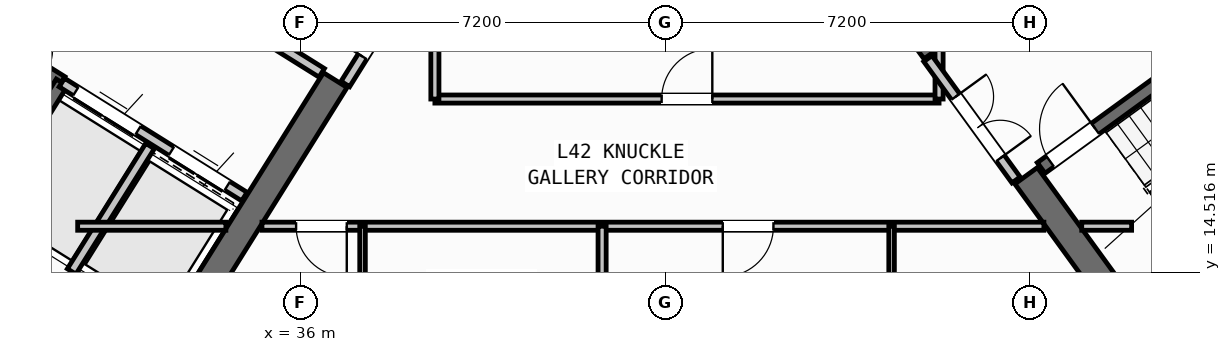
"""IFC4 building model, lengths in metres.
Left out: names, types, materials, properties, quantities, classifications, styles, units other than length and angle.
Written with IfcOpenShell. Run it as: python <this file> out.ifc"""

import sys

from ifc_helpers import new_model, si_unit, direction, frame, frame_2d, origin, place, context, subcontext, project, spatial, rectangle, extrude, source, transform, mapped, element, fill, save


model = new_model("IFC4")
c1 = context("Model", 3, precision=1e-05, world=origin(), true_north=direction((0.0, 1.0)))
c2 = subcontext(c1, "Body", "Model", "MODEL_VIEW")
j1 = project(units=[si_unit("LENGTHUNIT", "METRE"), si_unit("PLANEANGLEUNIT", "RADIAN")], contexts=[c1])
p1 = place(None, origin())
s1 = spatial("IfcSite", under=j1, at=p1, CompositionType="ELEMENT")
p2 = place(p1, origin())
s2 = spatial("IfcBuilding", under=s1, at=p2, CompositionType="ELEMENT")
p3 = place(p2, frame((0.0, 0.0, 165.9)))
s3 = spatial("IfcBuildingStorey", under=s2, at=p3, CompositionType="ELEMENT", Elevation=165.9)
p4 = place(p3, frame((33.366, 12.477, 0.0), z_axis=(0.0, 0.0, 1.0), x_axis=(-0.848047359947, 0.529920442413, 0.0)))
e1 = element("IfcWall", 1, at=p4, inside=s3, PredefinedType="SHEAR", context=c2, shape_type="SweptSolid", body=[
    extrude(rectangle(XDim=13.14, YDim=0.55, at=frame_2d((6.57, 0.0))), origin(), (0.0, 0.0, 1.0), 3.32),
])
p5 = place(p3, frame((36.683, 18.304, 0.0), z_axis=(0.0, 0.0, 1.0), x_axis=(-0.529896466841, -0.848062341122, 0.0)))
e2 = element("IfcWall", 2, at=p5, inside=s3, PredefinedType="SHEAR", context=c2, shape_type="SweptSolid", body=[
    extrude(rectangle(XDim=6.425, YDim=0.55, at=frame_2d((3.212, 0.0))), origin(), (0.0, 0.0, 1.0), 3.32),
])
p6 = place(p3, frame((52.359, 13.14, 0.0), z_axis=(0.0, 0.0, 1.0), x_axis=(0.809014896919, 0.587788139183, 0.0)))
e3 = element("IfcWall", 3, at=p6, inside=s3, PredefinedType="SHEAR", context=c2, shape_type="SweptSolid", body=[
    extrude(rectangle(XDim=12.34, YDim=0.55, at=frame_2d((6.17, 0.0))), origin(), (0.0, 0.0, 1.0), 3.32),
])
p7 = place(p3, frame((52.42, 13.524, 0.0), z_axis=(0.0, 0.0, 1.0), x_axis=(-0.587802113096, 0.809004744015, 0.0)))
e4 = element("IfcWall", 4, at=p7, inside=s3, PredefinedType="SHEAR", context=c2, shape_type="SweptSolid", body=[
    extrude(rectangle(XDim=3.575, YDim=0.55, at=frame_2d((1.788, 0.0))), origin(), (0.0, 0.0, 1.0), 3.32),
])
p8 = place(p3, frame((48.526, 18.884, 0.0), z_axis=(0.0, 0.0, 1.0), x_axis=(-0.587764933797, 0.809031756236, 0.0)))
e5 = element("IfcWall", 5, at=p8, inside=s3, PredefinedType="SHEAR", context=c2, shape_type="SweptSolid", body=[
    extrude(rectangle(XDim=6.425, YDim=0.55, at=frame_2d((3.212, 0.0))), origin(), (0.0, 0.0, 1.0), 3.32),
])
p9 = place(p3, frame((31.28, 18.261, 0.0), z_axis=(0.0, 0.0, 1.0), x_axis=(-0.848051618787, 0.529913626805, 0.0)))
e6 = element("IfcWall", 6, at=p9, inside=s3, PredefinedType="SHEAR", context=c2, shape_type="SweptSolid", body=[
    extrude(rectangle(XDim=7.46, YDim=0.26, at=frame_2d((3.73, 0.0))), origin(), (0.0, 0.0, 1.0), 3.32),
])
p10 = place(p9, frame((0.36, 0.0, 0.0)))
e7 = element("IfcOpeningElement", 7, at=p10, cuts=e6, PredefinedType="OPENING", context=c2, shape_type="SweptSolid", body=[
    extrude(rectangle(XDim=0.86, YDim=2.05, at=frame_2d((0.43, 1.025))), frame((0.0, 0.14, 0.0), z_axis=(0.0, -1.0, 0.0), x_axis=(1.0, 0.0, 0.0)), (0.0, 0.0, 1.0), 0.28),
])
p11 = place(p3, frame((31.288, 18.256, 0.0), z_axis=(0.0, 0.0, 1.0), x_axis=(-0.529943379326, -0.848033026897, 0.0)))
e8 = element("IfcWall", 8, at=p11, inside=s3, PredefinedType="SHEAR", context=c2, shape_type="SweptSolid", body=[
    extrude(rectangle(XDim=3.16, YDim=0.26, at=frame_2d((1.58, 0.0))), origin(), (0.0, 0.0, 1.0), 3.32),
])
p12 = place(p3, frame((34.891, 16.005, 0.0), z_axis=(0.0, 0.0, 1.0), x_axis=(-0.848062873452, 0.529895614884, 0.0)))
e9 = element("IfcWall", 9, at=p12, inside=s3, PredefinedType="STANDARD", context=c2, shape_type="SweptSolid", body=[
    extrude(rectangle(XDim=4.248, YDim=0.2, at=frame_2d((2.124, 0.0))), origin(), (0.0, 0.0, 1.0), 3.31),
])
p13 = place(p12, frame((0.398, 0.0, 0.0)))
e10 = element("IfcOpeningElement", 10, at=p13, cuts=e9, PredefinedType="OPENING", context=c2, shape_type="SweptSolid", body=[
    extrude(rectangle(XDim=1.3, YDim=2.2, at=frame_2d((0.65, 1.1))), frame((0.0, 0.11, 0.0), z_axis=(0.0, -1.0, 0.0), x_axis=(1.0, 0.0, 0.0)), (0.0, 0.0, 1.0), 0.22),
])
p14 = place(p12, frame((2.473, 0.0, 0.0)))
e11 = element("IfcOpeningElement", 11, at=p14, cuts=e9, PredefinedType="OPENING", context=c2, shape_type="SweptSolid", body=[
    extrude(rectangle(XDim=1.45, YDim=2.25, at=frame_2d((0.725, 1.125))), frame((0.0, 0.11, 0.0), z_axis=(0.0, -1.0, 0.0), x_axis=(1.0, 0.0, 0.0)), (0.0, 0.0, 1.0), 0.22),
])
p15 = place(p3, frame((36.417, 18.447, 0.0), z_axis=(0.0, 0.0, 1.0), x_axis=(-0.848064879198, 0.529892404805, 0.0)))
e12 = element("IfcWall", 12, at=p15, inside=s3, PredefinedType="STANDARD", context=c2, shape_type="SweptSolid", body=[
    extrude(rectangle(XDim=5.768, YDim=0.2, at=frame_2d((2.884, 0.0))), origin(), (0.0, 0.0, 1.0), 3.31),
])
p16 = place(p15, frame((2.548, 0.0, 0.0)))
e13 = element("IfcOpeningElement", 13, at=p16, cuts=e12, PredefinedType="OPENING", context=c2, shape_type="SweptSolid", body=[
    extrude(rectangle(XDim=1.15, YDim=2.1, at=frame_2d((0.575, 1.05))), frame((0.0, 0.11, 0.0), z_axis=(0.0, -1.0, 0.0), x_axis=(1.0, 0.0, 0.0)), (0.0, 0.0, 1.0), 0.22),
])
p17 = place(p3, frame((33.029, 17.003, 0.0), z_axis=(0.0, 0.0, 1.0), x_axis=(-0.529916267533, -0.848049968695, 0.0)))
e14 = element("IfcWall", 14, at=p17, inside=s3, PredefinedType="STANDARD", context=c2, shape_type="SweptSolid", body=[
    extrude(rectangle(XDim=2.92, YDim=0.2, at=frame_2d((1.46, 0.0))), origin(), (0.0, 0.0, 1.0), 3.31),
])
p18 = place(p3, frame((52.472, 14.013, 0.0), z_axis=(0.0, 0.0, 1.0), x_axis=(0.809028366311, 0.587769599847, 0.0)))
e15 = element("IfcWall", 15, at=p18, inside=s3, PredefinedType="SHEAR", context=c2, shape_type="SweptSolid", body=[
    extrude(rectangle(XDim=7.33, YDim=0.26, at=frame_2d((3.665, 0.0))), origin(), (0.0, 0.0, 1.0), 3.32),
])
p19 = place(p3, frame((50.615, 16.57, 0.0), z_axis=(0.0, 0.0, 1.0), x_axis=(0.809028366311, 0.587769599847, 0.0)))
e16 = element("IfcWall", 16, at=p19, inside=s3, PredefinedType="SHEAR", context=c2, shape_type="SweptSolid", body=[
    extrude(rectangle(XDim=7.33, YDim=0.26, at=frame_2d((3.665, 0.0))), origin(), (0.0, 0.0, 1.0), 3.32),
])
p20 = place(p19, frame((0.22, 0.0, 0.0)))
e17 = element("IfcOpeningElement", 17, at=p20, cuts=e16, PredefinedType="OPENING", context=c2, shape_type="SweptSolid", body=[
    extrude(rectangle(XDim=1.1, YDim=2.1, at=frame_2d((0.55, 1.05))), frame((0.0, 0.14, 0.0), z_axis=(0.0, -1.0, 0.0), x_axis=(1.0, 0.0, 0.0)), (0.0, 0.0, 1.0), 0.28),
])
p21 = place(p3, frame((32.164, 10.374, 0.0), z_axis=(0.0, 0.0, 1.0), x_axis=(-0.848044107957, 0.529925646633, 0.0)))
e18 = element("IfcWall", 18, at=p21, inside=s3, PredefinedType="PARTITIONING", context=c2, shape_type="SweptSolid", body=[
    extrude(rectangle(XDim=15.57, YDim=0.16, at=frame_2d((7.785, 0.0))), origin(), (0.0, 0.0, 1.0), 3.31),
])
p22 = place(p21, frame((10.83, 0.0, 0.0)))
e19 = element("IfcOpeningElement", 19, at=p22, cuts=e18, PredefinedType="OPENING", context=c2, shape_type="SweptSolid", body=[
    extrude(rectangle(XDim=1.0, YDim=2.1, at=frame_2d((0.5, 1.05))), frame((0.0, 0.09, 0.0), z_axis=(0.0, -1.0, 0.0), x_axis=(1.0, 0.0, 0.0)), (0.0, 0.0, 1.0), 0.18),
])
p23 = place(p3, frame((38.451, 20.737, 0.0), z_axis=(0.0, 0.0, 1.0), x_axis=(-0.529924799939, -0.848044637038, 0.0)))
e20 = element("IfcWall", 20, at=p23, inside=s3, PredefinedType="STANDARD", context=c2, shape_type="SweptSolid", body=[
    extrude(rectangle(XDim=2.96, YDim=0.2, at=frame_2d((1.48, 0.0))), origin(), (0.0, 0.0, 1.0), 3.31),
])
p24 = place(p23, frame((1.46, 0.0, 0.0)))
e21 = element("IfcOpeningElement", 21, at=p24, cuts=e20, PredefinedType="OPENING", context=c2, shape_type="SweptSolid", body=[
    extrude(rectangle(XDim=0.86, YDim=2.05, at=frame_2d((0.43, 1.025))), frame((0.0, 0.11, 0.0), z_axis=(0.0, -1.0, 0.0), x_axis=(1.0, 0.0, 0.0)), (0.0, 0.0, 1.0), 0.22),
])
p25 = place(p3, frame((31.6, 15.42, 0.0), z_axis=(0.0, 0.0, 1.0), x_axis=(1.0, 0.0, 0.0)))
e22 = element("IfcWall", 22, at=p25, inside=s3, PredefinedType="PARTITIONING", context=c2, shape_type="SweptSolid", body=[
    extrude(rectangle(XDim=2.925, YDim=0.16, at=frame_2d((1.462, 0.0))), origin(), (0.0, 0.0, 1.0), 3.31),
])
p26 = place(p3, frame((35.237, 15.42, 0.0), z_axis=(0.0, 0.0, 1.0), x_axis=(1.0, 0.0, 0.0)))
e23 = element("IfcWall", 23, at=p26, inside=s3, PredefinedType="PARTITIONING", context=c2, shape_type="SweptSolid", body=[
    extrude(rectangle(XDim=15.432, YDim=0.16, at=frame_2d((7.716, 0.0))), origin(), (0.0, 0.0, 1.0), 3.31),
])
p27 = place(p26, frame((0.674, 0.0, 0.0)))
e24 = element("IfcOpeningElement", 24, at=p27, cuts=e23, PredefinedType="OPENING", context=c2, shape_type="SweptSolid", body=[
    extrude(rectangle(XDim=1.0, YDim=2.1, at=frame_2d((0.5, 1.05))), frame((0.0, 0.09, 0.0), z_axis=(0.0, -1.0, 0.0), x_axis=(1.0, 0.0, 0.0)), (0.0, 0.0, 1.0), 0.18),
])
p28 = place(p26, frame((9.094, 0.0, 0.0)))
e25 = element("IfcOpeningElement", 25, at=p28, cuts=e23, PredefinedType="OPENING", context=c2, shape_type="SweptSolid", body=[
    extrude(rectangle(XDim=1.0, YDim=2.1, at=frame_2d((0.5, 1.05))), frame((0.0, 0.09, 0.0), z_axis=(0.0, -1.0, 0.0), x_axis=(1.0, 0.0, 0.0)), (0.0, 0.0, 1.0), 0.18),
])
p29 = place(p3, frame((51.416, 15.42, 0.0), z_axis=(0.0, 0.0, 1.0), x_axis=(1.0, 0.0, 0.0)))
e26 = element("IfcWall", 26, at=p29, inside=s3, PredefinedType="PARTITIONING", context=c2, shape_type="SweptSolid", body=[
    extrude(rectangle(XDim=0.984, YDim=0.16, at=frame_2d((0.492, 0.0))), origin(), (0.0, 0.0, 1.0), 3.31),
])
p30 = place(p3, frame((38.65, 17.93, 0.0), z_axis=(0.0, 0.0, 1.0), x_axis=(1.0, 0.0, 0.0)))
e27 = element("IfcWall", 27, at=p30, inside=s3, PredefinedType="PARTITIONING", context=c2, shape_type="SweptSolid", body=[
    extrude(rectangle(XDim=9.95, YDim=0.16, at=frame_2d((4.975, 0.0))), origin(), (0.0, 0.0, 1.0), 3.31),
])
p31 = place(p30, frame((4.475, 0.0, 0.0)))
e28 = element("IfcOpeningElement", 28, at=p31, cuts=e27, PredefinedType="OPENING", context=c2, shape_type="SweptSolid", body=[
    extrude(rectangle(XDim=1.0, YDim=2.1, at=frame_2d((0.5, 1.05))), frame((0.0, 0.09, 0.0), z_axis=(0.0, -1.0, 0.0), x_axis=(1.0, 0.0, 0.0)), (0.0, 0.0, 1.0), 0.18),
])
p32 = place(p3, frame((38.65, 17.93, 0.0), z_axis=(0.0, 0.0, 1.0), x_axis=(0.0, 1.0, 0.0)))
e29 = element("IfcWall", 29, at=p32, inside=s3, PredefinedType="PARTITIONING", context=c2, shape_type="SweptSolid", body=[
    extrude(rectangle(XDim=2.951, YDim=0.16, at=frame_2d((1.476, 0.0))), origin(), (0.0, 0.0, 1.0), 3.31),
])
p33 = place(p3, frame((48.6, 17.93, 0.0), z_axis=(0.0, 0.0, 1.0), x_axis=(0.0, 1.0, 0.0)))
e30 = element("IfcWall", 30, at=p33, inside=s3, PredefinedType="PARTITIONING", context=c2, shape_type="SweptSolid", body=[
    extrude(rectangle(XDim=0.993, YDim=0.16, at=frame_2d((0.496, 0.0))), origin(), (0.0, 0.0, 1.0), 3.31),
])
p34 = place(p3, frame((50.119, 16.333, 0.0), z_axis=(0.0, 0.0, 1.0), x_axis=(-0.587749856981, 0.809042709391, 0.0)))
e31 = element("IfcWall", 31, at=p34, inside=s3, PredefinedType="STANDARD", context=c2, shape_type="SweptSolid", body=[
    extrude(rectangle(XDim=2.96, YDim=0.2, at=frame_2d((1.48, 0.0))), origin(), (0.0, 0.0, 1.0), 3.31),
])
p35 = place(p34, frame((0.53, 0.0, 0.0)))
e32 = element("IfcOpeningElement", 32, at=p35, cuts=e31, PredefinedType="OPENING", context=c2, shape_type="SweptSolid", body=[
    extrude(rectangle(XDim=1.5, YDim=2.15, at=frame_2d((0.75, 1.075))), frame((0.0, 0.11, 0.0), z_axis=(0.0, -1.0, 0.0), x_axis=(1.0, 0.0, 0.0)), (0.0, 0.0, 1.0), 0.22),
])
p36 = place(p3, frame((41.95, 1.96, 0.0), z_axis=(0.0, 0.0, 1.0), x_axis=(0.0, 1.0, 0.0)))
e33 = element("IfcWall", 33, at=p36, inside=s3, PredefinedType="PARTITIONING", context=c2, shape_type="SweptSolid", body=[
    extrude(rectangle(XDim=13.46, YDim=0.16, at=frame_2d((6.73, 0.0))), origin(), (0.0, 0.0, 1.0), 3.31),
])
p37 = place(p3, frame((37.222, 1.96, 0.0), z_axis=(0.0, 0.0, 1.0), x_axis=(0.0, 1.0, 0.0)))
e34 = element("IfcWall", 34, at=p37, inside=s3, PredefinedType="PARTITIONING", context=c2, shape_type="SweptSolid", body=[
    extrude(rectangle(XDim=13.46, YDim=0.11, at=frame_2d((6.73, 0.0))), origin(), (0.0, 0.0, 1.0), 3.31),
])
p38 = place(p37, frame((5.2, 0.0, 0.0)))
e35 = element("IfcOpeningElement", 35, at=p38, cuts=e34, PredefinedType="OPENING", context=c2, shape_type="SweptSolid", body=[
    extrude(rectangle(XDim=0.92, YDim=2.08, at=frame_2d((0.46, 1.04))), frame((0.0, 0.065, 0.0), z_axis=(0.0, -1.0, 0.0), x_axis=(1.0, 0.0, 0.0)), (0.0, 0.0, 1.0), 0.13),
])
p39 = place(p37, frame((10.45, 0.0, 0.0)))
e36 = element("IfcOpeningElement", 36, at=p39, cuts=e34, PredefinedType="OPENING", context=c2, shape_type="SweptSolid", body=[
    extrude(rectangle(XDim=0.88, YDim=2.08, at=frame_2d((0.44, 1.04))), frame((0.0, 0.065, 0.0), z_axis=(0.0, -1.0, 0.0), x_axis=(1.0, 0.0, 0.0)), (0.0, 0.0, 1.0), 0.13),
])
p40 = place(p3, frame((47.663, 1.96, 0.0), z_axis=(0.0, 0.0, 1.0), x_axis=(0.0, 1.0, 0.0)))
e37 = element("IfcWall", 37, at=p40, inside=s3, PredefinedType="PARTITIONING", context=c2, shape_type="SweptSolid", body=[
    extrude(rectangle(XDim=13.46, YDim=0.11, at=frame_2d((6.73, 0.0))), origin(), (0.0, 0.0, 1.0), 3.31),
])
p41 = place(p40, frame((6.3, 0.0, 0.0)))
e38 = element("IfcOpeningElement", 38, at=p41, cuts=e37, PredefinedType="OPENING", context=c2, shape_type="SweptSolid", body=[
    extrude(rectangle(XDim=0.92, YDim=2.08, at=frame_2d((0.46, 1.04))), frame((0.0, 0.065, 0.0), z_axis=(0.0, -1.0, 0.0), x_axis=(1.0, 0.0, 0.0)), (0.0, 0.0, 1.0), 0.13),
])
p42 = place(p40, frame((11.1, 0.0, 0.0)))
e39 = element("IfcOpeningElement", 39, at=p42, cuts=e37, PredefinedType="OPENING", context=c2, shape_type="SweptSolid", body=[
    extrude(rectangle(XDim=0.88, YDim=2.08, at=frame_2d((0.44, 1.04))), frame((0.0, 0.065, 0.0), z_axis=(0.0, -1.0, 0.0), x_axis=(1.0, 0.0, 0.0)), (0.0, 0.0, 1.0), 0.13),
])
m1 = source(origin(), c2, "Body", "SweptSolid", [
    extrude(rectangle(XDim=1.3, YDim=2.2, at=frame_2d((0.65, 1.1))), frame((0.0, 0.025, 0.0), z_axis=(0.0, -1.0, 0.0), x_axis=(1.0, 0.0, 0.0)), (0.0, 0.0, 1.0), 0.05),
])
p43 = place(p13, origin())
e40 = element("IfcDoor", 40, at=p43, inside=s3, OperationType="DOUBLE_DOOR_SLIDING", PredefinedType="DOOR", context=c2, shape_type="MappedRepresentation", body=[
    mapped(m1, transform((0.0, 0.0, 0.0), scale=1.0)),
])
fill(e10, e40)
m2 = source(origin(), c2, "Body", "SweptSolid", [
    extrude(rectangle(XDim=1.45, YDim=2.25, at=frame_2d((0.725, 1.125))), frame((0.0, 0.025, 0.0), z_axis=(0.0, -1.0, 0.0), x_axis=(1.0, 0.0, 0.0)), (0.0, 0.0, 1.0), 0.05),
])
p44 = place(p14, origin())
e41 = element("IfcDoor", 41, at=p44, inside=s3, OperationType="DOUBLE_DOOR_SLIDING", PredefinedType="DOOR", context=c2, shape_type="MappedRepresentation", body=[
    mapped(m2, transform((0.0, 0.0, 0.0), scale=1.0)),
])
fill(e11, e41)
m3 = source(origin(), c2, "Body", "SweptSolid", [
    extrude(rectangle(XDim=1.1, YDim=2.1, at=frame_2d((0.55, 1.05))), frame((0.0, 0.025, 0.0), z_axis=(0.0, -1.0, 0.0), x_axis=(1.0, 0.0, 0.0)), (0.0, 0.0, 1.0), 0.05),
])
p45 = place(p20, origin())
e42 = element("IfcDoor", 42, at=p45, inside=s3, OperationType="SINGLE_SWING_RIGHT", PredefinedType="DOOR", context=c2, shape_type="MappedRepresentation", body=[
    mapped(m3, transform((0.0, 0.0, 0.0), scale=1.0)),
])
fill(e17, e42)
m4 = source(origin(), c2, "Body", "SweptSolid", [
    extrude(rectangle(XDim=1.0, YDim=2.1, at=frame_2d((0.5, 1.05))), frame((0.0, 0.025, 0.0), z_axis=(0.0, -1.0, 0.0), x_axis=(1.0, 0.0, 0.0)), (0.0, 0.0, 1.0), 0.05),
])
p46 = place(p31, origin())
e43 = element("IfcDoor", 43, at=p46, inside=s3, OperationType="SINGLE_SWING_RIGHT", PredefinedType="DOOR", context=c2, shape_type="MappedRepresentation", body=[
    mapped(m4, transform((0.0, 0.0, 0.0), scale=1.0)),
])
fill(e28, e43)
m5 = source(origin(), c2, "Body", "SweptSolid", [
    extrude(rectangle(XDim=0.86, YDim=2.05, at=frame_2d((0.43, 1.025))), frame((0.0, 0.025, 0.0), z_axis=(0.0, -1.0, 0.0), x_axis=(1.0, 0.0, 0.0)), (0.0, 0.0, 1.0), 0.05),
])
p47 = place(p24, frame((0.86, 0.0, 0.0), z_axis=(0.0, 0.0, 1.0), x_axis=(-1.0, 0.0, 0.0)))
e44 = element("IfcDoor", 44, at=p47, inside=s3, OperationType="SINGLE_SWING_LEFT", PredefinedType="DOOR", context=c2, shape_type="MappedRepresentation", body=[
    mapped(m5, transform((0.0, 0.0, 0.0), scale=1.0)),
])
fill(e21, e44)
m6 = source(origin(), c2, "Body", "SweptSolid", [
    extrude(rectangle(XDim=1.5, YDim=2.15, at=frame_2d((0.75, 1.075))), frame((0.0, 0.025, 0.0), z_axis=(0.0, -1.0, 0.0), x_axis=(1.0, 0.0, 0.0)), (0.0, 0.0, 1.0), 0.05),
])
p48 = place(p35, frame((1.5, 0.0, 0.0), z_axis=(0.0, 0.0, 1.0), x_axis=(-1.0, 0.0, 0.0)))
e45 = element("IfcDoor", 45, at=p48, inside=s3, OperationType="DOUBLE_DOOR_SINGLE_SWING", PredefinedType="DOOR", context=c2, shape_type="MappedRepresentation", body=[
    mapped(m6, transform((0.0, 0.0, 0.0), scale=1.0)),
])
fill(e32, e45)
p49 = place(p27, frame((1.0, 0.0, 0.0), z_axis=(0.0, 0.0, 1.0), x_axis=(-1.0, 0.0, 0.0)))
e46 = element("IfcDoor", 46, at=p49, inside=s3, OperationType="SINGLE_SWING_LEFT", PredefinedType="DOOR", context=c2, shape_type="MappedRepresentation", body=[
    mapped(m4, transform((0.0, 0.0, 0.0), scale=1.0)),
])
fill(e24, e46)
p50 = place(p28, frame((1.0, 0.0, 0.0), z_axis=(0.0, 0.0, 1.0), x_axis=(-1.0, 0.0, 0.0)))
e47 = element("IfcDoor", 47, at=p50, inside=s3, OperationType="SINGLE_SWING_RIGHT", PredefinedType="DOOR", context=c2, shape_type="MappedRepresentation", body=[
    mapped(m4, transform((0.0, 0.0, 0.0), scale=1.0)),
])
fill(e25, e47)
save(model, sys.argv[1])
